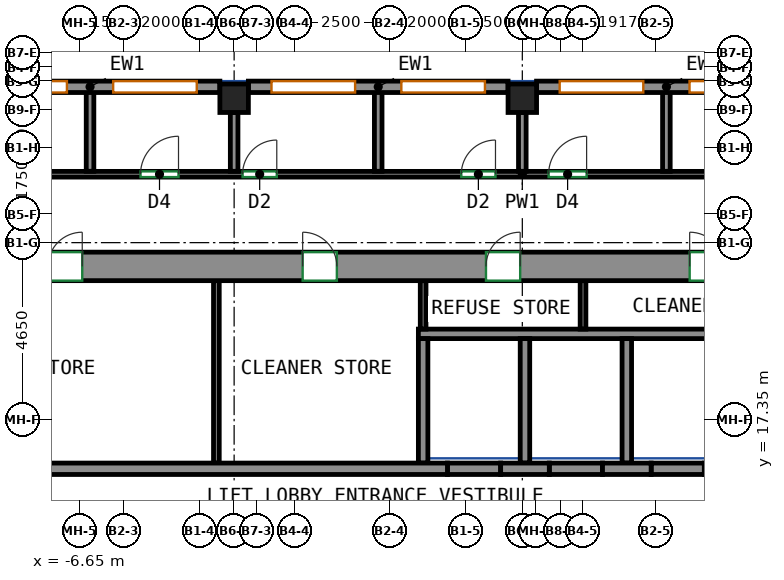
"""IFC4 building model, lengths in metres.
Left out: names, types, materials, properties, quantities, classifications, styles, units other than length and angle.
Written with IfcOpenShell. Run it as: python <this file> out.ifc"""

import sys

from ifc_helpers import new_model, si_unit, direction, frame, frame_2d, origin, origin_2d, place, context, subcontext, project, spatial, rectangle, extrude, source, transform, mapped, element, fill, save


model = new_model("IFC4")
c1 = context("Model", 3, precision=1e-05, world=origin(), true_north=direction((0.0, 1.0)))
c2 = subcontext(c1, "Body", "Model", "MODEL_VIEW")
j1 = project(units=[si_unit("LENGTHUNIT", "METRE"), si_unit("PLANEANGLEUNIT", "RADIAN")], contexts=[c1])
p1 = place(None, origin())
s1 = spatial("IfcSite", under=j1, at=p1, CompositionType="ELEMENT")
p2 = place(p1, origin())
s2 = spatial("IfcBuilding", under=s1, at=p2, CompositionType="ELEMENT")
p3 = place(p2, frame((0.0, 0.0, 199.9)))
s3 = spatial("IfcBuildingStorey", under=s2, at=p3, CompositionType="ELEMENT", Elevation=199.9)
m1 = source(origin(), c2, "Body", "SweptSolid", [
    extrude(rectangle(XDim=0.75, YDim=0.75, at=origin_2d()), origin(), (0.0, 0.0, 1.0), 3.12),
])
for number, where, z_axis, x_axis in (
    (1, (-2.583, 25.8, 0.0), (0.0, 0.0, 1.0), (1.0, 0.0, 0.0)),
    (2, (5.0, 25.8, 0.0), (0.0, 0.0, 1.0), (1.0, 0.0, 0.0)),
):
    element("IfcColumn", number, at=place(p3, frame(where, z_axis=z_axis, x_axis=x_axis)), inside=s3, PredefinedType="COLUMN", context=c2, shape_type="MappedRepresentation", body=[
        mapped(m1, transform((0.0, 0.0, 0.0))),
    ])
m2 = source(origin(), c2, "Body", "SweptSolid", [
    extrude(rectangle(XDim=33.6, YDim=0.75, at=frame_2d((16.8, 0.0))), origin(), (0.0, 0.0, 1.0), 3.12),
])
p4 = place(p3, frame((-15.75, 21.375, 0.0), z_axis=(0.0, 0.0, 1.0), x_axis=(1.0, 0.0, 0.0)))
e3 = element("IfcWall", 3, at=p4, inside=s3, PredefinedType="SHEAR", context=c2, shape_type="MappedRepresentation", body=[
    mapped(m2, transform((0.0, 0.0, 0.0))),
])
p5 = place(p4, frame((8.27, 0.0, 0.0)))
e4 = element("IfcOpeningElement", 4, at=p5, cuts=e3, PredefinedType="OPENING", context=c2, shape_type="SweptSolid", body=[
    extrude(rectangle(XDim=0.9, YDim=2.1, at=frame_2d((0.45, 1.05))), frame((0.0, 0.385, 0.0), z_axis=(0.0, -1.0, 0.0), x_axis=(1.0, 0.0, 0.0)), (0.0, 0.0, 1.0), 0.77),
])
p6 = place(p4, frame((14.97, 0.0, 0.0)))
e5 = element("IfcOpeningElement", 5, at=p6, cuts=e3, PredefinedType="OPENING", context=c2, shape_type="SweptSolid", body=[
    extrude(rectangle(XDim=0.9, YDim=2.1, at=frame_2d((0.45, 1.05))), frame((0.0, 0.385, 0.0), z_axis=(0.0, -1.0, 0.0), x_axis=(1.0, 0.0, 0.0)), (0.0, 0.0, 1.0), 0.77),
])
p7 = place(p4, frame((19.794, 0.0, 0.0)))
e6 = element("IfcOpeningElement", 6, at=p7, cuts=e3, PredefinedType="OPENING", context=c2, shape_type="SweptSolid", body=[
    extrude(rectangle(XDim=0.9, YDim=2.1, at=frame_2d((0.45, 1.05))), frame((0.0, 0.385, 0.0), z_axis=(0.0, -1.0, 0.0), x_axis=(1.0, 0.0, 0.0)), (0.0, 0.0, 1.0), 0.77),
])
p8 = place(p4, frame((25.154, 0.0, 0.0)))
e7 = element("IfcOpeningElement", 7, at=p8, cuts=e3, PredefinedType="OPENING", context=c2, shape_type="SweptSolid", body=[
    extrude(rectangle(XDim=0.9, YDim=2.1, at=frame_2d((0.45, 1.05))), frame((0.0, 0.385, 0.0), z_axis=(0.0, -1.0, 0.0), x_axis=(1.0, 0.0, 0.0)), (0.0, 0.0, 1.0), 0.77),
])
p9 = place(p4, frame((2.275, 0.0, 0.0)))
e8 = element("IfcOpeningElement", 8, at=p9, cuts=e3, PredefinedType="OPENING", context=c2, shape_type="SweptSolid", body=[
    extrude(rectangle(XDim=0.9, YDim=2.1, at=frame_2d((0.45, 1.05))), frame((0.0, 0.385, 0.0), z_axis=(0.0, -1.0, 0.0), x_axis=(1.0, 0.0, 0.0)), (0.0, 0.0, 1.0), 0.77),
])
p10 = place(p4, frame((30.425, 0.0, 0.0)))
e9 = element("IfcOpeningElement", 9, at=p10, cuts=e3, PredefinedType="OPENING", context=c2, shape_type="SweptSolid", body=[
    extrude(rectangle(XDim=0.9, YDim=2.1, at=frame_2d((0.45, 1.05))), frame((0.0, 0.385, 0.0), z_axis=(0.0, -1.0, 0.0), x_axis=(1.0, 0.0, 0.0)), (0.0, 0.0, 1.0), 0.77),
])
m3 = source(origin(), c2, "Body", "SweptSolid", [
    extrude(rectangle(XDim=14.04, YDim=0.3, at=frame_2d((7.02, 0.0))), origin(), (0.0, 0.0, 1.0), 3.12),
])
p11 = place(p3, frame((-11.01, 16.05, 0.0), z_axis=(0.0, 0.0, 1.0), x_axis=(1.0, 0.0, 0.0)))
e10 = element("IfcWall", 10, at=p11, inside=s3, PredefinedType="SHEAR", context=c2, shape_type="MappedRepresentation", body=[
    mapped(m3, transform((0.0, 0.0, 0.0))),
])
m4 = source(origin(), c2, "Body", "SweptSolid", [
    extrude(rectangle(XDim=1.28, YDim=0.3, at=frame_2d((0.64, 0.0))), origin(), (0.0, 0.0, 1.0), 3.12),
])
p12 = place(p3, frame((4.43, 16.05, 0.0), z_axis=(0.0, 0.0, 1.0), x_axis=(1.0, 0.0, 0.0)))
e11 = element("IfcWall", 11, at=p12, inside=s3, PredefinedType="SHEAR", context=c2, shape_type="MappedRepresentation", body=[
    mapped(m4, transform((0.0, 0.0, 0.0))),
])
m5 = source(origin(), c2, "Body", "SweptSolid", [
    extrude(rectangle(XDim=1.28, YDim=0.3, at=frame_2d((0.64, 0.0))), origin(), (0.0, 0.0, 1.0), 3.12),
])
p13 = place(p3, frame((7.11, 16.05, 0.0), z_axis=(0.0, 0.0, 1.0), x_axis=(1.0, 0.0, 0.0)))
e12 = element("IfcWall", 12, at=p13, inside=s3, PredefinedType="SHEAR", context=c2, shape_type="MappedRepresentation", body=[
    mapped(m5, transform((0.0, 0.0, 0.0))),
])
p14 = place(p3, frame((9.79, 16.05, 0.0), z_axis=(0.0, 0.0, 1.0), x_axis=(1.0, 0.0, 0.0)))
e13 = element("IfcWall", 13, at=p14, inside=s3, PredefinedType="SHEAR", context=c2, shape_type="MappedRepresentation", body=[
    mapped(m4, transform((0.0, 0.0, 0.0))),
])
m6 = source(origin(), c2, "Body", "SweptSolid", [
    extrude(rectangle(XDim=6.833, YDim=0.3, at=frame_2d((3.417, 0.0))), origin(), (0.0, 0.0, 1.0), 3.12),
])
p15 = place(p3, frame((12.208, 26.1, 0.0), z_axis=(0.0, 0.0, 1.0), x_axis=(-1.0, 0.0, 0.0)))
e14 = element("IfcWall", 14, at=p15, inside=s3, PredefinedType="SOLIDWALL", context=c2, shape_type="MappedRepresentation", body=[
    mapped(m6, transform((0.0, 0.0, 0.0))),
])
p16 = place(p15, frame((0.608, 0.0, 0.85)))
e15 = element("IfcOpeningElement", 15, at=p16, cuts=e14, PredefinedType="OPENING", context=c2, shape_type="SweptSolid", body=[
    extrude(rectangle(XDim=2.2, YDim=1.95, at=frame_2d((1.1, 0.975))), frame((0.0, 0.16, 0.0), z_axis=(0.0, -1.0, 0.0), x_axis=(1.0, 0.0, 0.0)), (0.0, 0.0, 1.0), 0.32),
])
p17 = place(p15, frame((4.025, 0.0, 0.85)))
e16 = element("IfcOpeningElement", 16, at=p17, cuts=e14, PredefinedType="OPENING", context=c2, shape_type="SweptSolid", body=[
    extrude(rectangle(XDim=2.2, YDim=1.95, at=frame_2d((1.1, 0.975))), frame((0.0, 0.16, 0.0), z_axis=(0.0, -1.0, 0.0), x_axis=(1.0, 0.0, 0.0)), (0.0, 0.0, 1.0), 0.32),
])
p18 = place(p3, frame((4.625, 26.1, 0.0), z_axis=(0.0, 0.0, 1.0), x_axis=(-1.0, 0.0, 0.0)))
e17 = element("IfcWall", 17, at=p18, inside=s3, PredefinedType="SOLIDWALL", context=c2, shape_type="MappedRepresentation", body=[
    mapped(m6, transform((0.0, 0.0, 0.0))),
])
p19 = place(p18, frame((0.608, 0.0, 0.85)))
e18 = element("IfcOpeningElement", 18, at=p19, cuts=e17, PredefinedType="OPENING", context=c2, shape_type="SweptSolid", body=[
    extrude(rectangle(XDim=2.2, YDim=1.95, at=frame_2d((1.1, 0.975))), frame((0.0, 0.16, 0.0), z_axis=(0.0, -1.0, 0.0), x_axis=(1.0, 0.0, 0.0)), (0.0, 0.0, 1.0), 0.32),
])
p20 = place(p18, frame((4.025, 0.0, 0.85)))
e19 = element("IfcOpeningElement", 19, at=p20, cuts=e17, PredefinedType="OPENING", context=c2, shape_type="SweptSolid", body=[
    extrude(rectangle(XDim=2.2, YDim=1.95, at=frame_2d((1.1, 0.975))), frame((0.0, 0.16, 0.0), z_axis=(0.0, -1.0, 0.0), x_axis=(1.0, 0.0, 0.0)), (0.0, 0.0, 1.0), 0.32),
])
m7 = source(origin(), c2, "Body", "SweptSolid", [
    extrude(rectangle(XDim=6.833, YDim=0.3, at=frame_2d((3.417, 0.0))), origin(), (0.0, 0.0, 1.0), 3.12),
])
p21 = place(p3, frame((-2.958, 26.1, 0.0), z_axis=(0.0, 0.0, 1.0), x_axis=(-1.0, 0.0, 0.0)))
e20 = element("IfcWall", 20, at=p21, inside=s3, PredefinedType="SOLIDWALL", context=c2, shape_type="MappedRepresentation", body=[
    mapped(m7, transform((0.0, 0.0, 0.0))),
])
p22 = place(p21, frame((0.608, 0.0, 0.85)))
e21 = element("IfcOpeningElement", 21, at=p22, cuts=e20, PredefinedType="OPENING", context=c2, shape_type="SweptSolid", body=[
    extrude(rectangle(XDim=2.2, YDim=1.95, at=frame_2d((1.1, 0.975))), frame((0.0, 0.16, 0.0), z_axis=(0.0, -1.0, 0.0), x_axis=(1.0, 0.0, 0.0)), (0.0, 0.0, 1.0), 0.32),
])
p23 = place(p21, frame((4.025, 0.0, 0.85)))
e22 = element("IfcOpeningElement", 22, at=p23, cuts=e20, PredefinedType="OPENING", context=c2, shape_type="SweptSolid", body=[
    extrude(rectangle(XDim=2.2, YDim=1.95, at=frame_2d((1.1, 0.975))), frame((0.0, 0.16, 0.0), z_axis=(0.0, -1.0, 0.0), x_axis=(1.0, 0.0, 0.0)), (0.0, 0.0, 1.0), 0.32),
])
m8 = source(origin(), c2, "Body", "SweptSolid", [
    extrude(rectangle(XDim=1.4, YDim=0.3, at=frame_2d((0.7, 0.0))), origin(), (0.0, 0.0, 1.0), 3.12),
])
p24 = place(p3, frame((3.03, 16.05, 0.0), z_axis=(0.0, 0.0, 1.0), x_axis=(1.0, 0.0, 0.0)))
e23 = element("IfcWall", 23, at=p24, inside=s3, PredefinedType="PARTITIONING", context=c2, shape_type="MappedRepresentation", body=[
    mapped(m8, transform((0.0, 0.0, 0.0))),
])
m9 = source(origin(), c2, "Body", "SweptSolid", [
    extrude(rectangle(XDim=1.4, YDim=0.3, at=frame_2d((0.7, 0.0))), origin(), (0.0, 0.0, 1.0), 3.12),
])
for number, where, z_axis, x_axis in (
    (24, (5.71, 16.05, 0.0), (0.0, 0.0, 1.0), (1.0, 0.0, 0.0)),
    (25, (8.39, 16.05, 0.0), (0.0, 0.0, 1.0), (1.0, 0.0, 0.0)),
):
    element("IfcWall", number, at=place(p3, frame(where, z_axis=z_axis, x_axis=x_axis)), inside=s3, PredefinedType="PARTITIONING", context=c2, shape_type="MappedRepresentation", body=[
        mapped(m9, transform((0.0, 0.0, 0.0))),
    ])
m10 = source(origin(), c2, "Body", "SweptSolid", [
    extrude(rectangle(XDim=10.97, YDim=0.25, at=frame_2d((5.485, 0.0))), origin(), (0.0, 0.0, 1.0), 3.12),
])
p25 = place(p3, frame((2.265, 19.6, 0.0), z_axis=(0.0, 0.0, 1.0), x_axis=(1.0, 0.0, 0.0)))
e26 = element("IfcWall", 26, at=p25, inside=s3, PredefinedType="PARTITIONING", context=c2, shape_type="MappedRepresentation", body=[
    mapped(m10, transform((0.0, 0.0, 0.0))),
])
m11 = source(origin(), c2, "Body", "SweptSolid", [
    extrude(rectangle(XDim=3.275, YDim=0.25, at=frame_2d((1.638, 0.0))), origin(), (0.0, 0.0, 1.0), 3.12),
])
for number, where, z_axis, x_axis in (
    (27, (2.39, 16.2, 0.0), (0.0, 0.0, 1.0), (0.0, 1.0, 0.0)),
    (28, (5.07, 16.2, 0.0), (0.0, 0.0, 1.0), (0.0, 1.0, 0.0)),
    (29, (7.75, 16.2, 0.0), (0.0, 0.0, 1.0), (0.0, 1.0, 0.0)),
):
    element("IfcWall", number, at=place(p3, frame(where, z_axis=z_axis, x_axis=x_axis)), inside=s3, PredefinedType="PARTITIONING", context=c2, shape_type="MappedRepresentation", body=[
        mapped(m11, transform((0.0, 0.0, 0.0))),
    ])
m12 = source(origin(), c2, "Body", "SweptSolid", [
    extrude(rectangle(XDim=4.8, YDim=0.15, at=frame_2d((2.4, 0.0))), origin(), (0.0, 0.0, 1.0), 3.12),
])
p26 = place(p3, frame((-3.05, 16.2, 0.0), z_axis=(0.0, 0.0, 1.0), x_axis=(0.0, 1.0, 0.0)))
e30 = element("IfcWall", 30, at=p26, inside=s3, PredefinedType="PARTITIONING", context=c2, shape_type="MappedRepresentation", body=[
    mapped(m12, transform((0.0, 0.0, 0.0))),
])
m13 = source(origin(), c2, "Body", "SweptSolid", [
    extrude(rectangle(XDim=1.275, YDim=0.15, at=frame_2d((0.637, 0.0))), origin(), (0.0, 0.0, 1.0), 3.12),
])
for number, where, z_axis, x_axis in (
    (31, (2.39, 19.725, 0.0), (0.0, 0.0, 1.0), (0.0, 1.0, 0.0)),
    (32, (6.598, 19.725, 0.0), (0.0, 0.0, 1.0), (0.0, 1.0, 0.0)),
):
    element("IfcWall", number, at=place(p3, frame(where, z_axis=z_axis, x_axis=x_axis)), inside=s3, PredefinedType="PARTITIONING", context=c2, shape_type="MappedRepresentation", body=[
        mapped(m13, transform((0.0, 0.0, 0.0))),
    ])
p27 = place(p3, frame((-17.85, 23.8, 0.0), z_axis=(0.0, 0.0, 1.0), x_axis=(1.0, 0.0, 0.0)))
e33 = element("IfcWall", 33, at=p27, inside=s3, PredefinedType="PARTITIONING", context=c2, shape_type="SweptSolid", body=[
    extrude(rectangle(XDim=45.7, YDim=0.15, at=frame_2d((22.85, 0.0))), origin(), (0.0, 0.0, 1.0), 3.12),
])
p28 = place(p27, frame((0.6, 0.0, 0.0)))
e34 = element("IfcOpeningElement", 34, at=p28, cuts=e33, PredefinedType="OPENING", context=c2, shape_type="SweptSolid", body=[
    extrude(rectangle(XDim=0.9, YDim=2.1, at=frame_2d((0.45, 1.05))), frame((0.0, 0.085, 0.0), z_axis=(0.0, -1.0, 0.0), x_axis=(1.0, 0.0, 0.0)), (0.0, 0.0, 1.0), 0.17),
])
p29 = place(p27, frame((4.081, 0.0, 0.0)))
e35 = element("IfcOpeningElement", 35, at=p29, cuts=e33, PredefinedType="OPENING", context=c2, shape_type="SweptSolid", body=[
    extrude(rectangle(XDim=1.0, YDim=2.1, at=frame_2d((0.5, 1.05))), frame((0.0, 0.085, 0.0), z_axis=(0.0, -1.0, 0.0), x_axis=(1.0, 0.0, 0.0)), (0.0, 0.0, 1.0), 0.17),
])
p30 = place(p27, frame((9.481, 0.0, 0.0)))
e36 = element("IfcOpeningElement", 36, at=p30, cuts=e33, PredefinedType="OPENING", context=c2, shape_type="SweptSolid", body=[
    extrude(rectangle(XDim=0.9, YDim=2.1, at=frame_2d((0.45, 1.05))), frame((0.0, 0.085, 0.0), z_axis=(0.0, -1.0, 0.0), x_axis=(1.0, 0.0, 0.0)), (0.0, 0.0, 1.0), 0.17),
])
p31 = place(p27, frame((12.803, 0.0, 0.0)))
e37 = element("IfcOpeningElement", 37, at=p31, cuts=e33, PredefinedType="OPENING", context=c2, shape_type="SweptSolid", body=[
    extrude(rectangle(XDim=1.0, YDim=2.1, at=frame_2d((0.5, 1.05))), frame((0.0, 0.085, 0.0), z_axis=(0.0, -1.0, 0.0), x_axis=(1.0, 0.0, 0.0)), (0.0, 0.0, 1.0), 0.17),
])
p32 = place(p27, frame((15.489, 0.0, 0.0)))
e38 = element("IfcOpeningElement", 38, at=p32, cuts=e33, PredefinedType="OPENING", context=c2, shape_type="SweptSolid", body=[
    extrude(rectangle(XDim=0.9, YDim=2.1, at=frame_2d((0.45, 1.05))), frame((0.0, 0.085, 0.0), z_axis=(0.0, -1.0, 0.0), x_axis=(1.0, 0.0, 0.0)), (0.0, 0.0, 1.0), 0.17),
])
p33 = place(p27, frame((21.244, 0.0, 0.0)))
e39 = element("IfcOpeningElement", 39, at=p33, cuts=e33, PredefinedType="OPENING", context=c2, shape_type="SweptSolid", body=[
    extrude(rectangle(XDim=0.9, YDim=2.1, at=frame_2d((0.45, 1.05))), frame((0.0, 0.085, 0.0), z_axis=(0.0, -1.0, 0.0), x_axis=(1.0, 0.0, 0.0)), (0.0, 0.0, 1.0), 0.17),
])
p34 = place(p27, frame((23.542, 0.0, 0.0)))
e40 = element("IfcOpeningElement", 40, at=p34, cuts=e33, PredefinedType="OPENING", context=c2, shape_type="SweptSolid", body=[
    extrude(rectangle(XDim=1.0, YDim=2.1, at=frame_2d((0.5, 1.05))), frame((0.0, 0.085, 0.0), z_axis=(0.0, -1.0, 0.0), x_axis=(1.0, 0.0, 0.0)), (0.0, 0.0, 1.0), 0.17),
])
p35 = place(p27, frame((28.841, 0.0, 0.0)))
e41 = element("IfcOpeningElement", 41, at=p35, cuts=e33, PredefinedType="OPENING", context=c2, shape_type="SweptSolid", body=[
    extrude(rectangle(XDim=0.9, YDim=2.1, at=frame_2d((0.45, 1.05))), frame((0.0, 0.085, 0.0), z_axis=(0.0, -1.0, 0.0), x_axis=(1.0, 0.0, 0.0)), (0.0, 0.0, 1.0), 0.17),
])
p36 = place(p27, frame((32.331, 0.0, 0.0)))
e42 = element("IfcOpeningElement", 42, at=p36, cuts=e33, PredefinedType="OPENING", context=c2, shape_type="SweptSolid", body=[
    extrude(rectangle(XDim=1.0, YDim=2.1, at=frame_2d((0.5, 1.05))), frame((0.0, 0.085, 0.0), z_axis=(0.0, -1.0, 0.0), x_axis=(1.0, 0.0, 0.0)), (0.0, 0.0, 1.0), 0.17),
])
p37 = place(p27, frame((35.42, 0.0, 0.0)))
e43 = element("IfcOpeningElement", 43, at=p37, cuts=e33, PredefinedType="OPENING", context=c2, shape_type="SweptSolid", body=[
    extrude(rectangle(XDim=0.9, YDim=2.1, at=frame_2d((0.45, 1.05))), frame((0.0, 0.085, 0.0), z_axis=(0.0, -1.0, 0.0), x_axis=(1.0, 0.0, 0.0)), (0.0, 0.0, 1.0), 0.17),
])
p38 = place(p27, frame((40.317, 0.0, 0.0)))
e44 = element("IfcOpeningElement", 44, at=p38, cuts=e33, PredefinedType="OPENING", context=c2, shape_type="SweptSolid", body=[
    extrude(rectangle(XDim=0.9, YDim=2.1, at=frame_2d((0.45, 1.05))), frame((0.0, 0.085, 0.0), z_axis=(0.0, -1.0, 0.0), x_axis=(1.0, 0.0, 0.0)), (0.0, 0.0, 1.0), 0.17),
])
p39 = place(p27, frame((43.199, 0.0, 0.0)))
e45 = element("IfcOpeningElement", 45, at=p39, cuts=e33, PredefinedType="OPENING", context=c2, shape_type="SweptSolid", body=[
    extrude(rectangle(XDim=1.0, YDim=2.1, at=frame_2d((0.5, 1.05))), frame((0.0, 0.085, 0.0), z_axis=(0.0, -1.0, 0.0), x_axis=(1.0, 0.0, 0.0)), (0.0, 0.0, 1.0), 0.17),
])
p40 = place(p3, frame((-6.375, 23.877, 0.0), z_axis=(0.0, 0.0, 1.0), x_axis=(0.0, 1.0, 0.0)))
e46 = element("IfcWall", 46, at=p40, inside=s3, PredefinedType="PARTITIONING", context=c2, shape_type="SweptSolid", body=[
    extrude(rectangle(XDim=2.123, YDim=0.2, at=frame_2d((1.062, 0.0))), origin(), (0.0, 0.0, 1.0), 3.12),
])
p41 = place(p3, frame((-2.583, 23.877, 0.0), z_axis=(0.0, 0.0, 1.0), x_axis=(0.0, 1.0, 0.0)))
e47 = element("IfcWall", 47, at=p41, inside=s3, PredefinedType="PARTITIONING", context=c2, shape_type="SweptSolid", body=[
    extrude(rectangle(XDim=1.548, YDim=0.2, at=frame_2d((0.774, 0.0))), origin(), (0.0, 0.0, 1.0), 3.12),
])
p42 = place(p3, frame((1.208, 23.877, 0.0), z_axis=(0.0, 0.0, 1.0), x_axis=(0.0, 1.0, 0.0)))
e48 = element("IfcWall", 48, at=p42, inside=s3, PredefinedType="PARTITIONING", context=c2, shape_type="SweptSolid", body=[
    extrude(rectangle(XDim=2.123, YDim=0.2, at=frame_2d((1.062, 0.0))), origin(), (0.0, 0.0, 1.0), 3.12),
])
p43 = place(p3, frame((5.0, 23.877, 0.0), z_axis=(0.0, 0.0, 1.0), x_axis=(0.0, 1.0, 0.0)))
e49 = element("IfcWall", 49, at=p43, inside=s3, PredefinedType="PARTITIONING", context=c2, shape_type="SweptSolid", body=[
    extrude(rectangle(XDim=1.548, YDim=0.2, at=frame_2d((0.774, 0.0))), origin(), (0.0, 0.0, 1.0), 3.12),
])
p44 = place(p3, frame((8.791, 23.877, 0.0), z_axis=(0.0, 0.0, 1.0), x_axis=(0.0, 1.0, 0.0)))
e50 = element("IfcWall", 50, at=p44, inside=s3, PredefinedType="PARTITIONING", context=c2, shape_type="SweptSolid", body=[
    extrude(rectangle(XDim=2.123, YDim=0.2, at=frame_2d((1.062, 0.0))), origin(), (0.0, 0.0, 1.0), 3.12),
])
p45 = place(p16, origin())
e51 = element("IfcWindow", 51, at=p45, inside=s3, PartitioningType="SINGLE_PANEL", PredefinedType="WINDOW", context=c2, shape_type="SweptSolid", body=[
    extrude(rectangle(XDim=2.2, YDim=1.95, at=frame_2d((1.1, 0.975))), frame((0.0, 0.03, 0.0), z_axis=(0.0, -1.0, 0.0), x_axis=(1.0, 0.0, 0.0)), (0.0, 0.0, 1.0), 0.06),
])
fill(e15, e51)
p46 = place(p17, origin())
e52 = element("IfcWindow", 52, at=p46, inside=s3, PartitioningType="SINGLE_PANEL", PredefinedType="WINDOW", context=c2, shape_type="SweptSolid", body=[
    extrude(rectangle(XDim=2.2, YDim=1.95, at=frame_2d((1.1, 0.975))), frame((0.0, 0.03, 0.0), z_axis=(0.0, -1.0, 0.0), x_axis=(1.0, 0.0, 0.0)), (0.0, 0.0, 1.0), 0.06),
])
fill(e16, e52)
p47 = place(p19, origin())
e53 = element("IfcWindow", 53, at=p47, inside=s3, PartitioningType="SINGLE_PANEL", PredefinedType="WINDOW", context=c2, shape_type="SweptSolid", body=[
    extrude(rectangle(XDim=2.2, YDim=1.95, at=frame_2d((1.1, 0.975))), frame((0.0, 0.03, 0.0), z_axis=(0.0, -1.0, 0.0), x_axis=(1.0, 0.0, 0.0)), (0.0, 0.0, 1.0), 0.06),
])
fill(e18, e53)
p48 = place(p20, origin())
e54 = element("IfcWindow", 54, at=p48, inside=s3, PartitioningType="SINGLE_PANEL", PredefinedType="WINDOW", context=c2, shape_type="SweptSolid", body=[
    extrude(rectangle(XDim=2.2, YDim=1.95, at=frame_2d((1.1, 0.975))), frame((0.0, 0.03, 0.0), z_axis=(0.0, -1.0, 0.0), x_axis=(1.0, 0.0, 0.0)), (0.0, 0.0, 1.0), 0.06),
])
fill(e19, e54)
p49 = place(p22, origin())
e55 = element("IfcWindow", 55, at=p49, inside=s3, PartitioningType="SINGLE_PANEL", PredefinedType="WINDOW", context=c2, shape_type="SweptSolid", body=[
    extrude(rectangle(XDim=2.2, YDim=1.95, at=frame_2d((1.1, 0.975))), frame((0.0, 0.03, 0.0), z_axis=(0.0, -1.0, 0.0), x_axis=(1.0, 0.0, 0.0)), (0.0, 0.0, 1.0), 0.06),
])
fill(e21, e55)
p50 = place(p23, origin())
e56 = element("IfcWindow", 56, at=p50, inside=s3, PartitioningType="SINGLE_PANEL", PredefinedType="WINDOW", context=c2, shape_type="SweptSolid", body=[
    extrude(rectangle(XDim=2.2, YDim=1.95, at=frame_2d((1.1, 0.975))), frame((0.0, 0.03, 0.0), z_axis=(0.0, -1.0, 0.0), x_axis=(1.0, 0.0, 0.0)), (0.0, 0.0, 1.0), 0.06),
])
fill(e22, e56)
p51 = place(p5, origin())
e57 = element("IfcDoor", 57, at=p51, inside=s3, OperationType="SINGLE_SWING_RIGHT", PredefinedType="DOOR", context=c2, shape_type="SweptSolid", body=[
    extrude(rectangle(XDim=0.9, YDim=2.1, at=frame_2d((0.45, 1.05))), frame((0.0, -0.23, 0.0), z_axis=(0.0, -1.0, 0.0), x_axis=(1.0, 0.0, 0.0)), (0.0, 0.0, 1.0), 0.05),
])
fill(e4, e57)
p52 = place(p6, origin())
e58 = element("IfcDoor", 58, at=p52, inside=s3, OperationType="SINGLE_SWING_LEFT", PredefinedType="DOOR", context=c2, shape_type="SweptSolid", body=[
    extrude(rectangle(XDim=0.9, YDim=2.1, at=frame_2d((0.45, 1.05))), frame((0.0, -0.23, 0.0), z_axis=(0.0, -1.0, 0.0), x_axis=(1.0, 0.0, 0.0)), (0.0, 0.0, 1.0), 0.05),
])
fill(e5, e58)
p53 = place(p7, origin())
e59 = element("IfcDoor", 59, at=p53, inside=s3, OperationType="SINGLE_SWING_RIGHT", PredefinedType="DOOR", context=c2, shape_type="SweptSolid", body=[
    extrude(rectangle(XDim=0.9, YDim=2.1, at=frame_2d((0.45, 1.05))), frame((0.0, -0.23, 0.0), z_axis=(0.0, -1.0, 0.0), x_axis=(1.0, 0.0, 0.0)), (0.0, 0.0, 1.0), 0.05),
])
fill(e6, e59)
p54 = place(p8, origin())
e60 = element("IfcDoor", 60, at=p54, inside=s3, OperationType="SINGLE_SWING_LEFT", PredefinedType="DOOR", context=c2, shape_type="SweptSolid", body=[
    extrude(rectangle(XDim=0.9, YDim=2.1, at=frame_2d((0.45, 1.05))), frame((0.0, -0.23, 0.0), z_axis=(0.0, -1.0, 0.0), x_axis=(1.0, 0.0, 0.0)), (0.0, 0.0, 1.0), 0.05),
])
fill(e7, e60)
p55 = place(p31, origin())
e61 = element("IfcDoor", 61, at=p55, inside=s3, OperationType="SINGLE_SWING_RIGHT", PredefinedType="DOOR", context=c2, shape_type="SweptSolid", body=[
    extrude(rectangle(XDim=1.0, YDim=2.1, at=frame_2d((0.5, 1.05))), frame((0.0, 0.025, 0.0), z_axis=(0.0, -1.0, 0.0), x_axis=(1.0, 0.0, 0.0)), (0.0, 0.0, 1.0), 0.05),
])
fill(e37, e61)
p56 = place(p32, origin())
e62 = element("IfcDoor", 62, at=p56, inside=s3, OperationType="SINGLE_SWING_RIGHT", PredefinedType="DOOR", context=c2, shape_type="SweptSolid", body=[
    extrude(rectangle(XDim=0.9, YDim=2.1, at=frame_2d((0.45, 1.05))), frame((0.0, 0.025, 0.0), z_axis=(0.0, -1.0, 0.0), x_axis=(1.0, 0.0, 0.0)), (0.0, 0.0, 1.0), 0.05),
])
fill(e38, e62)
p57 = place(p33, origin())
e63 = element("IfcDoor", 63, at=p57, inside=s3, OperationType="SINGLE_SWING_RIGHT", PredefinedType="DOOR", context=c2, shape_type="SweptSolid", body=[
    extrude(rectangle(XDim=0.9, YDim=2.1, at=frame_2d((0.45, 1.05))), frame((0.0, 0.025, 0.0), z_axis=(0.0, -1.0, 0.0), x_axis=(1.0, 0.0, 0.0)), (0.0, 0.0, 1.0), 0.05),
])
fill(e39, e63)
p58 = place(p34, origin())
e64 = element("IfcDoor", 64, at=p58, inside=s3, OperationType="SINGLE_SWING_RIGHT", PredefinedType="DOOR", context=c2, shape_type="SweptSolid", body=[
    extrude(rectangle(XDim=1.0, YDim=2.1, at=frame_2d((0.5, 1.05))), frame((0.0, 0.025, 0.0), z_axis=(0.0, -1.0, 0.0), x_axis=(1.0, 0.0, 0.0)), (0.0, 0.0, 1.0), 0.05),
])
fill(e40, e64)
save(model, sys.argv[1])
